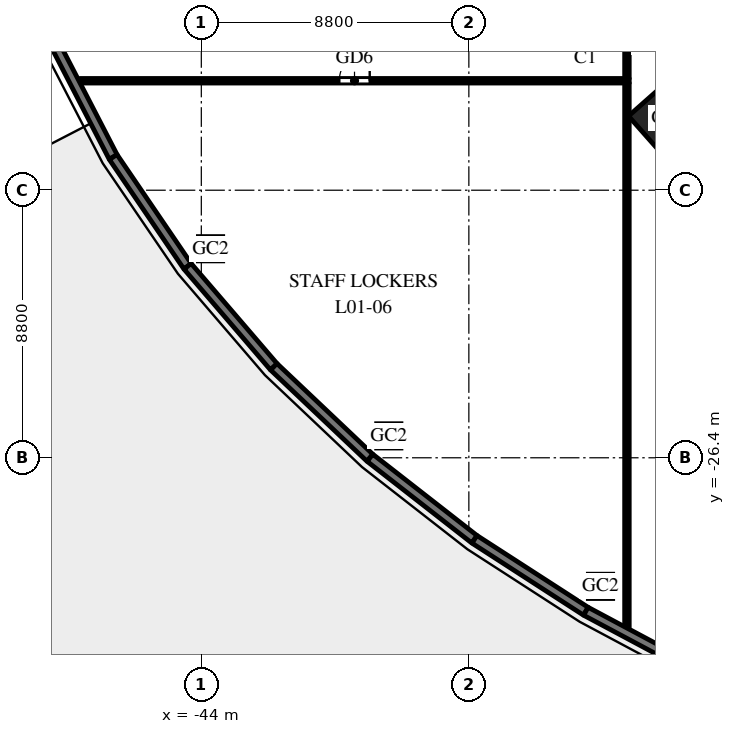
"""IFC4 building model, lengths in metres.
Left out: names, types, materials, properties, quantities, classifications, styles, units other than length and angle.
Written with IfcOpenShell. Run it as: python <this file> out.ifc"""

import sys

from ifc_helpers import new_model, si_unit, direction, frame, frame_2d, origin, origin_2d, place, context, subcontext, project, spatial, rectangle, hollow_rectangle, i_section, extrude, element, fill, save


model = new_model("IFC4")
c1 = context("Model", 3, precision=1e-05, world=origin(), true_north=direction((0.0, 1.0)))
c2 = subcontext(c1, "Body", "Model", "MODEL_VIEW")
j1 = project(units=[si_unit("LENGTHUNIT", "METRE"), si_unit("PLANEANGLEUNIT", "RADIAN")], contexts=[c1])
p1 = place(None, origin())
s1 = spatial("IfcSite", under=j1, at=p1, CompositionType="ELEMENT")
p2 = place(p1, origin())
s2 = spatial("IfcBuilding", under=s1, at=p2, CompositionType="ELEMENT")
p3 = place(p2, frame((0.0, 0.0, 7.5)))
s3 = spatial("IfcBuildingStorey", under=s2, at=p3, CompositionType="ELEMENT", Elevation=7.5)
p4 = place(p3, frame((-28.819, -15.23, 0.0), z_axis=(0.0, 0.0, 1.0), x_axis=(0.662635642662, -0.748941923699, 0.0)))
e1 = element("IfcColumn", 1, at=p4, inside=s3, PredefinedType="COLUMN", context=c2, shape_type="SweptSolid", body=[
    extrude(rectangle(XDim=1.6, YDim=1.6, at=origin_2d()), origin(), (0.0, 0.0, 1.0), 6.0),
])
for number, where, z_axis, x_axis in (
    (2, (-43.696, -19.525, 0.0), (0.0, 0.0, 1.0), (1.0, 0.0, 0.0)),
    (3, (-37.833, -25.68, 0.0), (0.0, 0.0, 1.0), (1.0, 0.0, 0.0)),
    (4, (-30.869, -30.629, 0.0), (0.0, 0.0, 1.0), (1.0, 0.0, 0.0)),
):
    element("IfcColumn", number, at=place(p3, frame(where, z_axis=z_axis, x_axis=x_axis)), inside=s3, PredefinedType="COLUMN", context=c2, shape_type="SweptSolid", body=[
        extrude(hollow_rectangle(XDim=0.8, YDim=0.8, WallThickness=0.04, at=origin_2d()), origin(), (0.0, 0.0, 1.0), 6.0),
    ])
p5 = place(p3, frame((-30.0, -31.97, 0.0), z_axis=(0.0, 0.0, 1.0), x_axis=(0.0, 1.0, 0.0)))
e5 = element("IfcWall", 5, at=p5, inside=s3, PredefinedType="PARTITIONING", context=c2, shape_type="SweptSolid", body=[
    extrude(rectangle(XDim=17.896, YDim=0.15, at=frame_2d((8.948, 0.0))), origin(), (0.0, 0.0, 1.0), 4.75),
])
p6 = place(p3, frame((-30.0, -13.926, 0.0), z_axis=(0.0, 0.0, 1.0), x_axis=(0.0, 1.0, 0.0)))
e6 = element("IfcWall", 6, at=p6, inside=s3, PredefinedType="PARTITIONING", context=c2, shape_type="SweptSolid", body=[
    extrude(rectangle(XDim=2.851, YDim=0.15, at=frame_2d((1.426, 0.0))), origin(), (0.0, 0.0, 1.0), 4.85),
])
p7 = place(p3, frame((-47.997, -14.0, 0.0), z_axis=(0.0, 0.0, 1.0), x_axis=(1.0, 0.0, 0.0)))
e7 = element("IfcWall", 7, at=p7, inside=s3, PredefinedType="PARTITIONING", context=c2, shape_type="SweptSolid", body=[
    extrude(rectangle(XDim=18.072, YDim=0.15, at=frame_2d((9.036, 0.0))), origin(), (0.0, 0.0, 1.0), 4.75),
])
p8 = place(p7, frame((8.536, 0.0, 0.0)))
e8 = element("IfcOpeningElement", 8, at=p8, cuts=e7, PredefinedType="OPENING", context=c2, shape_type="SweptSolid", body=[
    extrude(rectangle(XDim=1.0, YDim=2.1, at=frame_2d((0.5, 1.05))), frame((0.0, 0.085, 0.0), z_axis=(0.0, -1.0, 0.0), x_axis=(1.0, 0.0, 0.0)), (0.0, 0.0, 1.0), 0.17),
])
p9 = place(p3, frame((-48.894, -12.649, 0.0), z_axis=(0.0, 0.0, 1.0), x_axis=(0.459242531468, -0.888310923771, 0.0)))
e9 = element("IfcWall", 9, at=p9, inside=s3, PredefinedType="SOLIDWALL", context=c2, shape_type="SweptSolid", body=[
    extrude(rectangle(XDim=4.345, YDim=0.3, at=frame_2d((2.172, 0.0))), origin(), (0.0, 0.0, 1.0), 5.75),
])
p10 = place(p9, frame((0.972, 0.0, 1.0)))
e10 = element("IfcOpeningElement", 10, at=p10, cuts=e9, PredefinedType="OPENING", context=c2, shape_type="SweptSolid", body=[
    extrude(rectangle(XDim=2.4, YDim=3.0, at=frame_2d((1.2, 1.5))), frame((0.0, 0.16, 0.0), z_axis=(0.0, -1.0, 0.0), x_axis=(1.0, 0.0, 0.0)), (0.0, 0.0, 1.0), 0.32),
])
p11 = place(p3, frame((-46.899, -16.508, 0.0), z_axis=(0.0, 0.0, 1.0), x_axis=(0.562667738859, -0.82668314102, 0.0)))
e11 = element("IfcWall", 11, at=p11, inside=s3, PredefinedType="SOLIDWALL", context=c2, shape_type="SweptSolid", body=[
    extrude(rectangle(XDim=4.349, YDim=0.3, at=frame_2d((2.174, 0.0))), origin(), (0.0, 0.0, 1.0), 5.75),
])
p12 = place(p11, frame((0.974, 0.0, 1.0)))
e12 = element("IfcOpeningElement", 12, at=p12, cuts=e11, PredefinedType="OPENING", context=c2, shape_type="SweptSolid", body=[
    extrude(rectangle(XDim=2.4, YDim=3.0, at=frame_2d((1.2, 1.5))), frame((0.0, 0.16, 0.0), z_axis=(0.0, -1.0, 0.0), x_axis=(1.0, 0.0, 0.0)), (0.0, 0.0, 1.0), 0.32),
])
p13 = place(p3, frame((-44.452, -20.104, 0.0), z_axis=(0.0, 0.0, 1.0), x_axis=(0.651387059497, -0.758745608699, 0.0)))
e13 = element("IfcWall", 13, at=p13, inside=s3, PredefinedType="SOLIDWALL", context=c2, shape_type="SweptSolid", body=[
    extrude(rectangle(XDim=4.353, YDim=0.3, at=frame_2d((2.176, 0.0))), origin(), (0.0, 0.0, 1.0), 5.75),
])
p14 = place(p13, frame((0.976, 0.0, 1.0)))
e14 = element("IfcOpeningElement", 14, at=p14, cuts=e13, PredefinedType="OPENING", context=c2, shape_type="SweptSolid", body=[
    extrude(rectangle(XDim=2.4, YDim=3.0, at=frame_2d((1.2, 1.5))), frame((0.0, 0.16, 0.0), z_axis=(0.0, -1.0, 0.0), x_axis=(1.0, 0.0, 0.0)), (0.0, 0.0, 1.0), 0.32),
])
p15 = place(p3, frame((-41.617, -23.406, 0.0), z_axis=(0.0, 0.0, 1.0), x_axis=(0.72620446032, -0.687478786444, 0.0)))
e15 = element("IfcWall", 15, at=p15, inside=s3, PredefinedType="SOLIDWALL", context=c2, shape_type="SweptSolid", body=[
    extrude(rectangle(XDim=4.356, YDim=0.3, at=frame_2d((2.178, 0.0))), origin(), (0.0, 0.0, 1.0), 5.75),
])
p16 = place(p15, frame((0.978, 0.0, 1.0)))
e16 = element("IfcOpeningElement", 16, at=p16, cuts=e15, PredefinedType="OPENING", context=c2, shape_type="SweptSolid", body=[
    extrude(rectangle(XDim=2.4, YDim=3.0, at=frame_2d((1.2, 1.5))), frame((0.0, 0.16, 0.0), z_axis=(0.0, -1.0, 0.0), x_axis=(1.0, 0.0, 0.0)), (0.0, 0.0, 1.0), 0.32),
])
p17 = place(p3, frame((-38.453, -26.401, 0.0), z_axis=(0.0, 0.0, 1.0), x_axis=(0.788491985196, -0.615045030288, 0.0)))
e17 = element("IfcWall", 17, at=p17, inside=s3, PredefinedType="SOLIDWALL", context=c2, shape_type="SweptSolid", body=[
    extrude(rectangle(XDim=4.359, YDim=0.3, at=frame_2d((2.18, 0.0))), origin(), (0.0, 0.0, 1.0), 5.75),
])
p18 = place(p17, frame((0.98, 0.0, 1.0)))
e18 = element("IfcOpeningElement", 18, at=p18, cuts=e17, PredefinedType="OPENING", context=c2, shape_type="SweptSolid", body=[
    extrude(rectangle(XDim=2.4, YDim=3.0, at=frame_2d((1.2, 1.5))), frame((0.0, 0.16, 0.0), z_axis=(0.0, -1.0, 0.0), x_axis=(1.0, 0.0, 0.0)), (0.0, 0.0, 1.0), 0.32),
])
p19 = place(p3, frame((-35.016, -29.082, 0.0), z_axis=(0.0, 0.0, 1.0), x_axis=(0.840047348843, -0.542513088969, 0.0)))
e19 = element("IfcWall", 19, at=p19, inside=s3, PredefinedType="SOLIDWALL", context=c2, shape_type="SweptSolid", body=[
    extrude(rectangle(XDim=4.362, YDim=0.3, at=frame_2d((2.181, 0.0))), origin(), (0.0, 0.0, 1.0), 5.75),
])
p20 = place(p19, frame((0.981, 0.0, 1.0)))
e20 = element("IfcOpeningElement", 20, at=p20, cuts=e19, PredefinedType="OPENING", context=c2, shape_type="SweptSolid", body=[
    extrude(rectangle(XDim=2.4, YDim=3.0, at=frame_2d((1.2, 1.5))), frame((0.0, 0.16, 0.0), z_axis=(0.0, -1.0, 0.0), x_axis=(1.0, 0.0, 0.0)), (0.0, 0.0, 1.0), 0.32),
])
p21 = place(p3, frame((-31.352, -31.448, 0.0), z_axis=(0.0, 0.0, 1.0), x_axis=(0.882159305704, -0.47095112205, 0.0)))
e21 = element("IfcWall", 21, at=p21, inside=s3, PredefinedType="SOLIDWALL", context=c2, shape_type="SweptSolid", body=[
    extrude(rectangle(XDim=4.365, YDim=0.3, at=frame_2d((2.182, 0.0))), origin(), (0.0, 0.0, 1.0), 5.75),
])
p22 = place(p21, frame((1.622, 0.0, 1.0)))
e22 = element("IfcOpeningElement", 22, at=p22, cuts=e21, PredefinedType="OPENING", context=c2, shape_type="SweptSolid", body=[
    extrude(rectangle(XDim=2.4, YDim=3.0, at=frame_2d((1.2, 1.5))), frame((0.0, 0.16, 0.0), z_axis=(0.0, -1.0, 0.0), x_axis=(1.0, 0.0, 0.0)), (0.0, 0.0, 1.0), 0.32),
])
p23 = place(p2, origin())
s4 = spatial("IfcBuildingStorey", under=s2, at=p23, CompositionType="ELEMENT", Elevation=0.0)
for number, where, z_axis, x_axis in (
    (23, (-46.825, -17.327, -0.15), (0.0, 0.0, 1.0), (1.0, 0.0, 0.0)),
    (24, (-44.325, -23.014, -0.15), (0.0, 0.0, 1.0), (1.0, 0.0, 0.0)),
    (25, (-40.099, -27.597, -0.15), (0.0, 0.0, 1.0), (1.0, 0.0, 0.0)),
    (26, (-35.099, -29.504, -0.15), (0.0, 0.0, 1.0), (1.0, 0.0, 0.0)),
):
    element("IfcColumn", number, at=place(p23, frame(where, z_axis=z_axis, x_axis=x_axis)), inside=s4, PredefinedType="COLUMN", context=c2, shape_type="SweptSolid", body=[
        extrude(i_section(OverallWidth=0.3, OverallDepth=0.3, WebThickness=0.011, FlangeThickness=0.019, FilletRadius=0.027, at=origin_2d()), origin(), (0.0, 0.0, 1.0), 12.3),
    ])
p24 = place(p8, origin())
e27 = element("IfcDoor", 27, at=p24, inside=s3, OperationType="SINGLE_SWING_RIGHT", PredefinedType="DOOR", context=c2, shape_type="SweptSolid", body=[
    extrude(rectangle(XDim=1.0, YDim=2.1, at=frame_2d((0.5, 1.05))), frame((0.0, 0.025, 0.0), z_axis=(0.0, -1.0, 0.0), x_axis=(1.0, 0.0, 0.0)), (0.0, 0.0, 1.0), 0.05),
])
fill(e8, e27)
p25 = place(p10, origin())
e28 = element("IfcWindow", 28, at=p25, inside=s3, PartitioningType="SINGLE_PANEL", PredefinedType="WINDOW", context=c2, shape_type="SweptSolid", body=[
    extrude(rectangle(XDim=2.4, YDim=3.0, at=frame_2d((1.2, 1.5))), frame((0.0, 0.03, 0.0), z_axis=(0.0, -1.0, 0.0), x_axis=(1.0, 0.0, 0.0)), (0.0, 0.0, 1.0), 0.06),
])
fill(e10, e28)
p26 = place(p12, origin())
e29 = element("IfcWindow", 29, at=p26, inside=s3, PartitioningType="SINGLE_PANEL", PredefinedType="WINDOW", context=c2, shape_type="SweptSolid", body=[
    extrude(rectangle(XDim=2.4, YDim=3.0, at=frame_2d((1.2, 1.5))), frame((0.0, 0.03, 0.0), z_axis=(0.0, -1.0, 0.0), x_axis=(1.0, 0.0, 0.0)), (0.0, 0.0, 1.0), 0.06),
])
fill(e12, e29)
p27 = place(p14, origin())
e30 = element("IfcWindow", 30, at=p27, inside=s3, PartitioningType="SINGLE_PANEL", PredefinedType="WINDOW", context=c2, shape_type="SweptSolid", body=[
    extrude(rectangle(XDim=2.4, YDim=3.0, at=frame_2d((1.2, 1.5))), frame((0.0, 0.03, 0.0), z_axis=(0.0, -1.0, 0.0), x_axis=(1.0, 0.0, 0.0)), (0.0, 0.0, 1.0), 0.06),
])
fill(e14, e30)
p28 = place(p16, origin())
e31 = element("IfcWindow", 31, at=p28, inside=s3, PartitioningType="SINGLE_PANEL", PredefinedType="WINDOW", context=c2, shape_type="SweptSolid", body=[
    extrude(rectangle(XDim=2.4, YDim=3.0, at=frame_2d((1.2, 1.5))), frame((0.0, 0.03, 0.0), z_axis=(0.0, -1.0, 0.0), x_axis=(1.0, 0.0, 0.0)), (0.0, 0.0, 1.0), 0.06),
])
fill(e16, e31)
p29 = place(p18, origin())
e32 = element("IfcWindow", 32, at=p29, inside=s3, PartitioningType="SINGLE_PANEL", PredefinedType="WINDOW", context=c2, shape_type="SweptSolid", body=[
    extrude(rectangle(XDim=2.4, YDim=3.0, at=frame_2d((1.2, 1.5))), frame((0.0, 0.03, 0.0), z_axis=(0.0, -1.0, 0.0), x_axis=(1.0, 0.0, 0.0)), (0.0, 0.0, 1.0), 0.06),
])
fill(e18, e32)
p30 = place(p20, origin())
e33 = element("IfcWindow", 33, at=p30, inside=s3, PartitioningType="SINGLE_PANEL", PredefinedType="WINDOW", context=c2, shape_type="SweptSolid", body=[
    extrude(rectangle(XDim=2.4, YDim=3.0, at=frame_2d((1.2, 1.5))), frame((0.0, 0.03, 0.0), z_axis=(0.0, -1.0, 0.0), x_axis=(1.0, 0.0, 0.0)), (0.0, 0.0, 1.0), 0.06),
])
fill(e20, e33)
p31 = place(p22, origin())
e34 = element("IfcWindow", 34, at=p31, inside=s3, PartitioningType="SINGLE_PANEL", PredefinedType="WINDOW", context=c2, shape_type="SweptSolid", body=[
    extrude(rectangle(XDim=2.4, YDim=3.0, at=frame_2d((1.2, 1.5))), frame((0.0, 0.03, 0.0), z_axis=(0.0, -1.0, 0.0), x_axis=(1.0, 0.0, 0.0)), (0.0, 0.0, 1.0), 0.06),
])
fill(e22, e34)
save(model, sys.argv[1])
